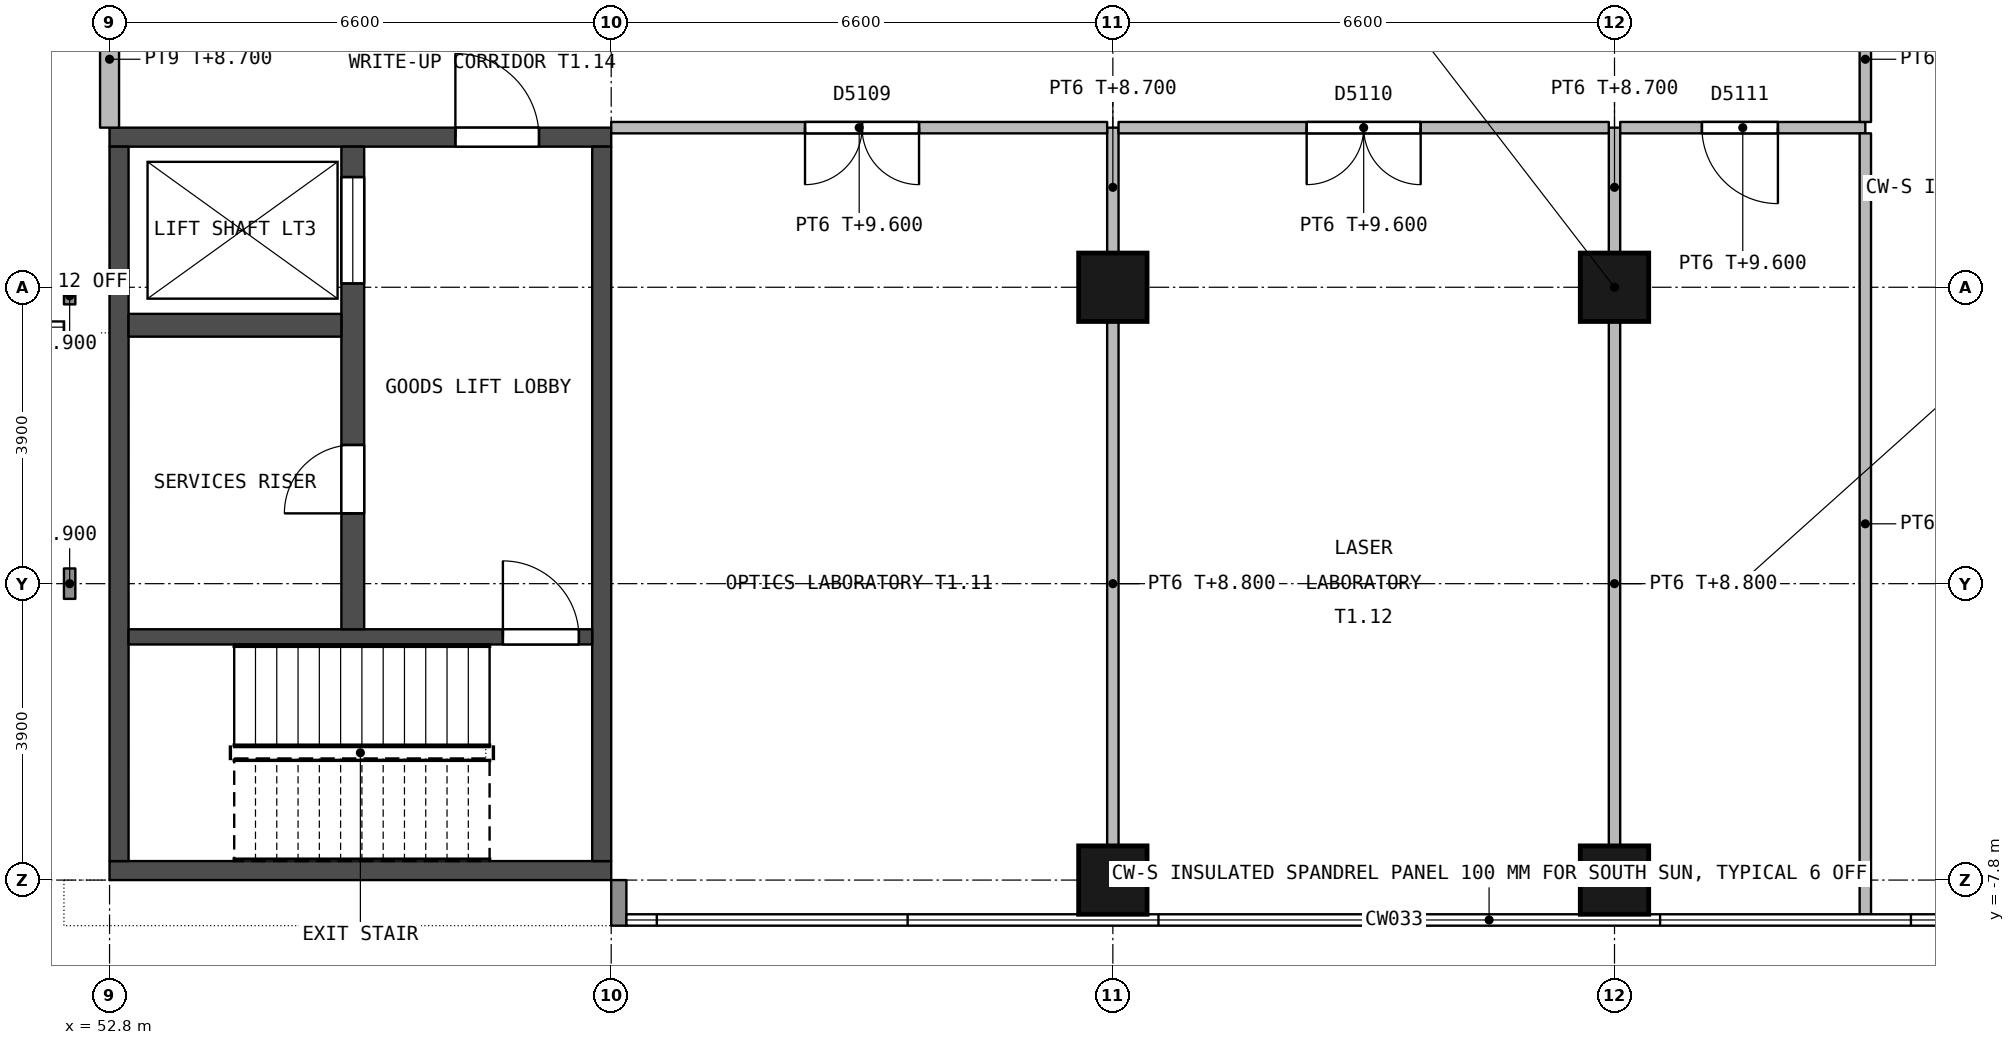
"""IFC4 building model, lengths in metres.
Left out: names, types, materials, properties, quantities, classifications, styles, units other than length and angle.
Written with IfcOpenShell. Run it as: python <this file> out.ifc"""

import sys

from ifc_helpers import new_model, si_unit, direction, frame, frame_2d, origin, origin_2d, place, context, subcontext, project, spatial, rectangle, extrude, element, fill, save


model = new_model("IFC4")
c1 = context("Model", 3, precision=1e-05, world=origin(), true_north=direction((0.0, 1.0)))
c2 = subcontext(c1, "Body", "Model", "MODEL_VIEW")
j1 = project(units=[si_unit("LENGTHUNIT", "METRE"), si_unit("PLANEANGLEUNIT", "RADIAN")], contexts=[c1])
p1 = place(None, origin())
s1 = spatial("IfcSite", under=j1, at=p1, CompositionType="ELEMENT")
p2 = place(p1, origin())
s2 = spatial("IfcBuilding", under=s1, at=p2, CompositionType="ELEMENT")
p3 = place(p2, frame((0.0, 0.0, 5.4)))
s3 = spatial("IfcBuildingStorey", under=s2, at=p3, CompositionType="ELEMENT", Elevation=5.4)
for number, where, z_axis, x_axis in (
    (1, (66.0, -7.8, 0.0), (0.0, 0.0, 1.0), (1.0, 0.0, 0.0)),
    (2, (66.0, 0.0, 0.0), (0.0, 0.0, 1.0), (1.0, 0.0, 0.0)),
    (3, (72.6, -7.8, 0.0), (0.0, 0.0, 1.0), (1.0, 0.0, 0.0)),
    (4, (72.6, 0.0, 0.0), (0.0, 0.0, 1.0), (1.0, 0.0, 0.0)),
):
    element("IfcColumn", number, at=place(p3, frame(where, z_axis=z_axis, x_axis=x_axis)), inside=s3, PredefinedType="COLUMN", context=c2, shape_type="SweptSolid", body=[
        extrude(rectangle(XDim=0.9, YDim=0.9, at=origin_2d()), origin(), (0.0, 0.0, 1.0), 4.5),
    ])
p4 = place(p3, frame((59.4, 1.975, 0.0), z_axis=(0.0, 0.0, 1.0), x_axis=(-1.0, 0.0, 0.0)))
e5 = element("IfcWall", 5, at=p4, inside=s3, PredefinedType="SHEAR", context=c2, shape_type="SweptSolid", body=[
    extrude(rectangle(XDim=6.6, YDim=0.25, at=frame_2d((3.3, 0.0))), origin(), (0.0, 0.0, 1.0), 4.2),
])
p5 = place(p4, frame((0.95, 0.0, 0.0)))
e6 = element("IfcOpeningElement", 6, at=p5, cuts=e5, PredefinedType="OPENING", context=c2, shape_type="SweptSolid", body=[
    extrude(rectangle(XDim=1.1, YDim=2.1, at=frame_2d((0.55, 1.05))), frame((0.0, 0.135, 0.0), z_axis=(0.0, -1.0, 0.0), x_axis=(1.0, 0.0, 0.0)), (0.0, 0.0, 1.0), 0.27),
])
p6 = place(p3, frame((59.4, -7.675, 0.0), z_axis=(0.0, 0.0, 1.0), x_axis=(-1.0, 0.0, 0.0)))
e7 = element("IfcWall", 7, at=p6, inside=s3, PredefinedType="SHEAR", context=c2, shape_type="SweptSolid", body=[
    extrude(rectangle(XDim=6.6, YDim=0.25, at=frame_2d((3.3, 0.0))), origin(), (0.0, 0.0, 1.0), 4.2),
])
for number, where, z_axis, x_axis in (
    (8, (59.275, 1.85, 0.0), (0.0, 0.0, 1.0), (0.0, -1.0, 0.0)),
    (9, (52.925, 1.85, 0.0), (0.0, 0.0, 1.0), (0.0, -1.0, 0.0)),
):
    element("IfcWall", number, at=place(p3, frame(where, z_axis=z_axis, x_axis=x_axis)), inside=s3, PredefinedType="SHEAR", context=c2, shape_type="SweptSolid", body=[
        extrude(rectangle(XDim=9.4, YDim=0.25, at=frame_2d((4.7, 0.0))), origin(), (0.0, 0.0, 1.0), 4.2),
    ])
p7 = place(p3, frame((59.15, -4.6, 0.0), z_axis=(0.0, 0.0, 1.0), x_axis=(-1.0, 0.0, 0.0)))
e10 = element("IfcWall", 10, at=p7, inside=s3, PredefinedType="SHEAR", context=c2, shape_type="SweptSolid", body=[
    extrude(rectangle(XDim=6.1, YDim=0.2, at=frame_2d((3.05, 0.0))), origin(), (0.0, 0.0, 1.0), 4.2),
])
p8 = place(p7, frame((0.175, 0.0, 0.0)))
e11 = element("IfcOpeningElement", 11, at=p8, cuts=e10, PredefinedType="OPENING", context=c2, shape_type="SweptSolid", body=[
    extrude(rectangle(XDim=1.0, YDim=2.1, at=frame_2d((0.5, 1.05))), frame((0.0, 0.11, 0.0), z_axis=(0.0, -1.0, 0.0), x_axis=(1.0, 0.0, 0.0)), (0.0, 0.0, 1.0), 0.22),
])
p9 = place(p3, frame((56.0, 1.85, 0.0), z_axis=(0.0, 0.0, 1.0), x_axis=(0.0, -1.0, 0.0)))
e12 = element("IfcWall", 12, at=p9, inside=s3, PredefinedType="SHEAR", context=c2, shape_type="SweptSolid", body=[
    extrude(rectangle(XDim=6.35, YDim=0.3, at=frame_2d((3.175, 0.0))), origin(), (0.0, 0.0, 1.0), 4.2),
])
p10 = place(p9, frame((3.925, 0.0, 0.0)))
e13 = element("IfcOpeningElement", 13, at=p10, cuts=e12, PredefinedType="OPENING", context=c2, shape_type="SweptSolid", body=[
    extrude(rectangle(XDim=0.9, YDim=2.1, at=frame_2d((0.45, 1.05))), frame((0.0, 0.16, 0.0), z_axis=(0.0, -1.0, 0.0), x_axis=(1.0, 0.0, 0.0)), (0.0, 0.0, 1.0), 0.32),
])
p11 = place(p9, frame((0.4, 0.0, 0.0)))
e14 = element("IfcOpeningElement", 14, at=p11, cuts=e12, PredefinedType="OPENING", context=c2, shape_type="SweptSolid", body=[
    extrude(rectangle(XDim=1.4, YDim=2.4, at=frame_2d((0.7, 1.2))), frame((0.0, 0.16, 0.0), z_axis=(0.0, -1.0, 0.0), x_axis=(1.0, 0.0, 0.0)), (0.0, 0.0, 1.0), 0.32),
])
p12 = place(p3, frame((55.85, -0.5, 0.0), z_axis=(0.0, 0.0, 1.0), x_axis=(-1.0, 0.0, 0.0)))
e15 = element("IfcWall", 15, at=p12, inside=s3, PredefinedType="SHEAR", context=c2, shape_type="SweptSolid", body=[
    extrude(rectangle(XDim=2.8, YDim=0.3, at=frame_2d((1.4, 0.0))), origin(), (0.0, 0.0, 1.0), 4.2),
])
p13 = place(p3, frame((59.5, -7.8, 0.0), z_axis=(0.0, 0.0, 1.0), x_axis=(0.0, -1.0, 0.0)))
e16 = element("IfcWall", 16, at=p13, inside=s3, PredefinedType="STANDARD", context=c2, shape_type="SweptSolid", body=[
    extrude(rectangle(XDim=0.6, YDim=0.2, at=frame_2d((0.3, 0.0))), origin(), (0.0, 0.0, 1.0), 3.5),
])
p14 = place(p3, frame((52.275, -4.1, 0.0), z_axis=(0.0, 0.0, 1.0), x_axis=(0.0, 1.0, 0.0)))
e17 = element("IfcWall", 17, at=p14, inside=s3, PredefinedType="STANDARD", context=c2, shape_type="SweptSolid", body=[
    extrude(rectangle(XDim=0.4, YDim=0.15, at=frame_2d((0.2, 0.0))), origin(), (0.0, 0.0, 1.0), 3.5),
])
p15 = place(p3, frame((52.275, -0.225, 0.0), z_axis=(0.0, 0.0, 1.0), x_axis=(0.0, 1.0, 0.0)))
e18 = element("IfcWall", 18, at=p15, inside=s3, PredefinedType="STANDARD", context=c2, shape_type="SweptSolid", body=[
    extrude(rectangle(XDim=0.225, YDim=0.15, at=frame_2d((0.113, 0.0))), origin(), (0.0, 0.0, 1.0), 3.5),
])
p16 = place(p3, frame((52.8, 2.1, 0.0), z_axis=(0.0, 0.0, 1.0), x_axis=(0.0, 1.0, 0.0)))
e19 = element("IfcWall", 19, at=p16, inside=s3, PredefinedType="PARTITIONING", context=c2, shape_type="SweptSolid", body=[
    extrude(rectangle(XDim=1.8, YDim=0.25, at=frame_2d((0.9, 0.0))), origin(), (0.0, 0.0, 1.0), 3.3),
])
p17 = place(p3, frame((66.0, -7.35, 0.0), z_axis=(0.0, 0.0, 1.0), x_axis=(0.0, 1.0, 0.0)))
e20 = element("IfcWall", 20, at=p17, inside=s3, PredefinedType="PARTITIONING", context=c2, shape_type="SweptSolid", body=[
    extrude(rectangle(XDim=6.9, YDim=0.15, at=frame_2d((3.45, 0.0))), origin(), (0.0, 0.0, 1.0), 3.4),
])
p18 = place(p3, frame((66.0, 0.45, 0.0), z_axis=(0.0, 0.0, 1.0), x_axis=(0.0, 1.0, 0.0)))
e21 = element("IfcWall", 21, at=p18, inside=s3, PredefinedType="PARTITIONING", context=c2, shape_type="SweptSolid", body=[
    extrude(rectangle(XDim=1.65, YDim=0.15, at=frame_2d((0.825, 0.0))), origin(), (0.0, 0.0, 1.0), 3.3),
])
p19 = place(p3, frame((65.925, 2.1, 0.0), z_axis=(0.0, 0.0, 1.0), x_axis=(-1.0, 0.0, 0.0)))
e22 = element("IfcWall", 22, at=p19, inside=s3, PredefinedType="PARTITIONING", context=c2, shape_type="SweptSolid", body=[
    extrude(rectangle(XDim=6.525, YDim=0.15, at=frame_2d((3.262, 0.0))), origin(), (0.0, 0.0, 1.0), 4.2),
])
p20 = place(p19, frame((2.475, 0.0, 0.0)))
e23 = element("IfcOpeningElement", 23, at=p20, cuts=e22, PredefinedType="OPENING", context=c2, shape_type="SweptSolid", body=[
    extrude(rectangle(XDim=1.5, YDim=2.1, at=frame_2d((0.75, 1.05))), frame((0.0, 0.085, 0.0), z_axis=(0.0, -1.0, 0.0), x_axis=(1.0, 0.0, 0.0)), (0.0, 0.0, 1.0), 0.17),
])
p21 = place(p3, frame((72.6, -7.35, 0.0), z_axis=(0.0, 0.0, 1.0), x_axis=(0.0, 1.0, 0.0)))
e24 = element("IfcWall", 24, at=p21, inside=s3, PredefinedType="PARTITIONING", context=c2, shape_type="SweptSolid", body=[
    extrude(rectangle(XDim=6.9, YDim=0.15, at=frame_2d((3.45, 0.0))), origin(), (0.0, 0.0, 1.0), 3.4),
])
p22 = place(p3, frame((72.6, 0.45, 0.0), z_axis=(0.0, 0.0, 1.0), x_axis=(0.0, 1.0, 0.0)))
e25 = element("IfcWall", 25, at=p22, inside=s3, PredefinedType="PARTITIONING", context=c2, shape_type="SweptSolid", body=[
    extrude(rectangle(XDim=1.65, YDim=0.15, at=frame_2d((0.825, 0.0))), origin(), (0.0, 0.0, 1.0), 3.3),
])
p23 = place(p3, frame((72.525, 2.1, 0.0), z_axis=(0.0, 0.0, 1.0), x_axis=(-1.0, 0.0, 0.0)))
e26 = element("IfcWall", 26, at=p23, inside=s3, PredefinedType="PARTITIONING", context=c2, shape_type="SweptSolid", body=[
    extrude(rectangle(XDim=6.45, YDim=0.15, at=frame_2d((3.225, 0.0))), origin(), (0.0, 0.0, 1.0), 4.2),
])
p24 = place(p23, frame((2.475, 0.0, 0.0)))
e27 = element("IfcOpeningElement", 27, at=p24, cuts=e26, PredefinedType="OPENING", context=c2, shape_type="SweptSolid", body=[
    extrude(rectangle(XDim=1.5, YDim=2.1, at=frame_2d((0.75, 1.05))), frame((0.0, 0.085, 0.0), z_axis=(0.0, -1.0, 0.0), x_axis=(1.0, 0.0, 0.0)), (0.0, 0.0, 1.0), 0.17),
])
p25 = place(p3, frame((75.9, 2.1, 0.0), z_axis=(0.0, 0.0, 1.0), x_axis=(-1.0, 0.0, 0.0)))
e28 = element("IfcWall", 28, at=p25, inside=s3, PredefinedType="PARTITIONING", context=c2, shape_type="SweptSolid", body=[
    extrude(rectangle(XDim=3.225, YDim=0.15, at=frame_2d((1.612, 0.0))), origin(), (0.0, 0.0, 1.0), 4.2),
])
p26 = place(p25, frame((1.15, 0.0, 0.0)))
e29 = element("IfcOpeningElement", 29, at=p26, cuts=e28, PredefinedType="OPENING", context=c2, shape_type="SweptSolid", body=[
    extrude(rectangle(XDim=1.0, YDim=2.1, at=frame_2d((0.5, 1.05))), frame((0.0, 0.085, 0.0), z_axis=(0.0, -1.0, 0.0), x_axis=(1.0, 0.0, 0.0)), (0.0, 0.0, 1.0), 0.17),
])
p27 = place(p3, frame((75.9, -8.25, 0.0), z_axis=(0.0, 0.0, 1.0), x_axis=(0.0, 1.0, 0.0)))
e30 = element("IfcWall", 30, at=p27, inside=s3, PredefinedType="PARTITIONING", context=c2, shape_type="SweptSolid", body=[
    extrude(rectangle(XDim=10.275, YDim=0.15, at=frame_2d((5.137, 0.0))), origin(), (0.0, 0.0, 1.0), 3.5),
])
p28 = place(p3, frame((75.9, 2.175, 0.0), z_axis=(0.0, 0.0, 1.0), x_axis=(0.0, 1.0, 0.0)))
e31 = element("IfcWall", 31, at=p28, inside=s3, PredefinedType="PARTITIONING", context=c2, shape_type="SweptSolid", body=[
    extrude(rectangle(XDim=1.65, YDim=0.15, at=frame_2d((0.825, 0.0))), origin(), (0.0, 0.0, 1.0), 4.2),
])
p29 = place(p10, origin())
e32 = element("IfcDoor", 32, at=p29, inside=s3, OperationType="SINGLE_SWING_RIGHT", PredefinedType="DOOR", context=c2, shape_type="SweptSolid", body=[
    extrude(rectangle(XDim=0.9, YDim=2.1, at=frame_2d((0.45, 1.05))), frame((0.0, 0.025, 0.0), z_axis=(0.0, -1.0, 0.0), x_axis=(1.0, 0.0, 0.0)), (0.0, 0.0, 1.0), 0.05),
])
fill(e13, e32)
p30 = place(p5, origin())
e33 = element("IfcDoor", 33, at=p30, inside=s3, OperationType="SINGLE_SWING_RIGHT", PredefinedType="DOOR", context=c2, shape_type="SweptSolid", body=[
    extrude(rectangle(XDim=1.1, YDim=2.1, at=frame_2d((0.55, 1.05))), frame((0.0, 0.025, 0.0), z_axis=(0.0, -1.0, 0.0), x_axis=(1.0, 0.0, 0.0)), (0.0, 0.0, 1.0), 0.05),
])
fill(e6, e33)
p31 = place(p8, origin())
e34 = element("IfcDoor", 34, at=p31, inside=s3, OperationType="SINGLE_SWING_RIGHT", PredefinedType="DOOR", context=c2, shape_type="SweptSolid", body=[
    extrude(rectangle(XDim=1.0, YDim=2.1, at=frame_2d((0.5, 1.05))), frame((0.0, 0.025, 0.0), z_axis=(0.0, -1.0, 0.0), x_axis=(1.0, 0.0, 0.0)), (0.0, 0.0, 1.0), 0.05),
])
fill(e11, e34)
p32 = place(p11, origin())
e35 = element("IfcDoor", 35, at=p32, inside=s3, OperationType="DOUBLE_DOOR_SLIDING", PredefinedType="NOTDEFINED", context=c2, shape_type="SweptSolid", body=[
    extrude(rectangle(XDim=1.4, YDim=2.4, at=frame_2d((0.7, 1.2))), frame((0.0, 0.025, 0.0), z_axis=(0.0, -1.0, 0.0), x_axis=(1.0, 0.0, 0.0)), (0.0, 0.0, 1.0), 0.05),
])
fill(e14, e35)
p33 = place(p20, origin())
e36 = element("IfcDoor", 36, at=p33, inside=s3, OperationType="DOUBLE_DOOR_SINGLE_SWING", PredefinedType="DOOR", context=c2, shape_type="SweptSolid", body=[
    extrude(rectangle(XDim=1.5, YDim=2.1, at=frame_2d((0.75, 1.05))), frame((0.0, 0.027, 0.0), z_axis=(0.0, -1.0, 0.0), x_axis=(1.0, 0.0, 0.0)), (0.0, 0.0, 1.0), 0.054),
])
fill(e23, e36)
p34 = place(p24, origin())
e37 = element("IfcDoor", 37, at=p34, inside=s3, OperationType="DOUBLE_DOOR_SINGLE_SWING", PredefinedType="DOOR", context=c2, shape_type="SweptSolid", body=[
    extrude(rectangle(XDim=1.5, YDim=2.1, at=frame_2d((0.75, 1.05))), frame((0.0, 0.027, 0.0), z_axis=(0.0, -1.0, 0.0), x_axis=(1.0, 0.0, 0.0)), (0.0, 0.0, 1.0), 0.054),
])
fill(e27, e37)
p35 = place(p26, origin())
e38 = element("IfcDoor", 38, at=p35, inside=s3, OperationType="SINGLE_SWING_LEFT", PredefinedType="DOOR", context=c2, shape_type="SweptSolid", body=[
    extrude(rectangle(XDim=1.0, YDim=2.1, at=frame_2d((0.5, 1.05))), frame((0.0, 0.027, 0.0), z_axis=(0.0, -1.0, 0.0), x_axis=(1.0, 0.0, 0.0)), (0.0, 0.0, 1.0), 0.054),
])
fill(e29, e38)
save(model, sys.argv[1])
